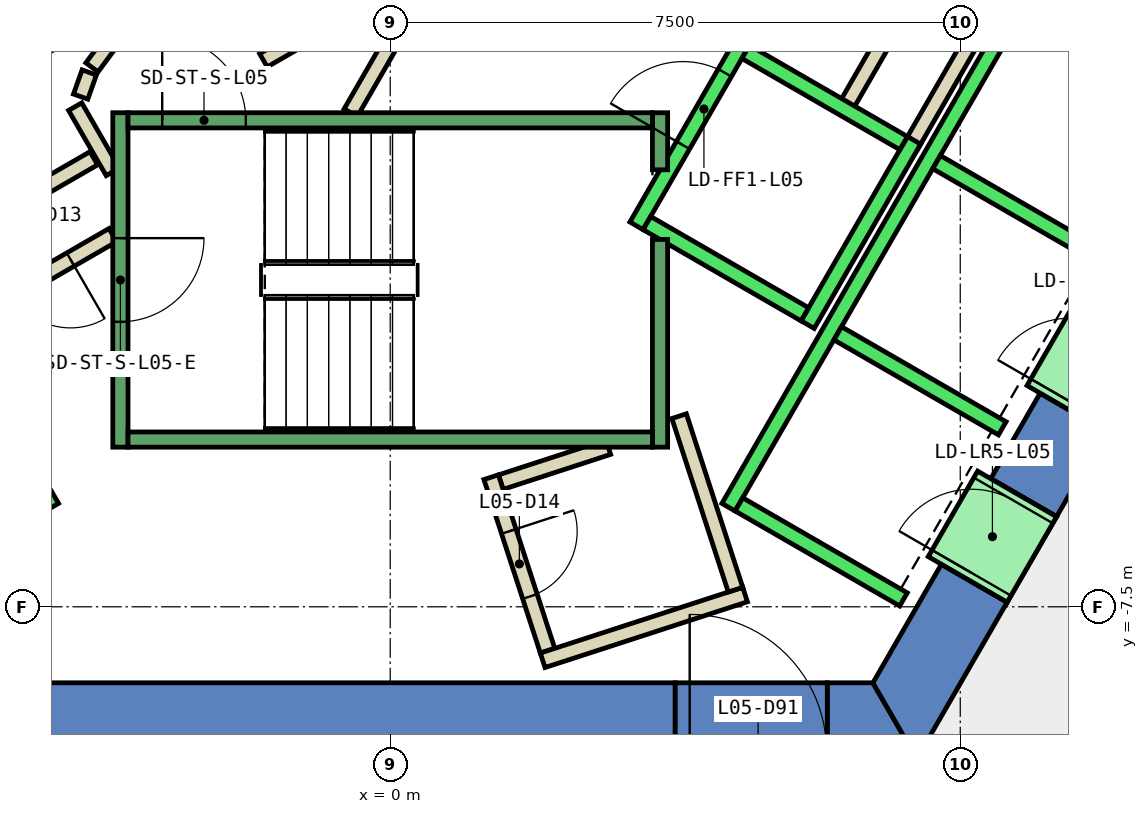
"""IFC4 building model, lengths in metres.
Left out: names, types, materials, properties, quantities, classifications, styles, units other than length and angle.
Written with IfcOpenShell. Run it as: python <this file> out.ifc"""

import sys

from ifc_helpers import new_model, si_unit, direction, frame, frame_2d, origin, place, context, subcontext, project, spatial, polyline, rectangle, outline, extrude, element, fill, save


model = new_model("IFC4")
c1 = context("Model", 3, precision=1e-05, world=origin(), true_north=direction((0.0, 1.0)))
c2 = subcontext(c1, "Body", "Model", "MODEL_VIEW")
j1 = project(units=[si_unit("LENGTHUNIT", "METRE"), si_unit("PLANEANGLEUNIT", "RADIAN")], contexts=[c1])
p1 = place(None, origin())
s1 = spatial("IfcSite", under=j1, at=p1, CompositionType="ELEMENT")
p2 = place(p1, origin())
s2 = spatial("IfcBuilding", under=s1, at=p2, CompositionType="ELEMENT")
p3 = place(p2, frame((0.0, 0.0, 30.0)))
s3 = spatial("IfcBuildingStorey", under=s2, at=p3, CompositionType="ELEMENT", Elevation=30.0)
p4 = place(p3, frame((0.0, 0.0, -0.45)))
e1 = element("IfcWall", 1, at=p4, inside=s3, PredefinedType="SHEAR", context=c2, shape_type="SweptSolid", body=[
    extrude(outline(polyline([(3.75, -9.5), (3.75, -8.5), (-6.351, -8.5), (-6.928, -9.5), (3.75, -9.5)])), origin(), (0.0, 0.0, 1.0), 4.85),
])
p5 = place(p3, frame((0.0, 0.0, -0.45)))
e2 = element("IfcWall", 2, at=p5, inside=s3, PredefinedType="SHEAR", context=c2, shape_type="SweptSolid", body=[
    extrude(outline(polyline([(5.75, -8.5), (5.75, -9.5), (6.928, -9.5), (6.351, -8.5), (5.75, -8.5)])), origin(), (0.0, 0.0, 1.0), 4.85),
])
p6 = place(p3, frame((0.0, 0.0, 3.6)))
e3 = element("IfcWall", 3, at=p6, inside=s3, PredefinedType="SHEAR", context=c2, shape_type="SweptSolid", body=[
    extrude(outline(polyline([(5.75, -9.5), (5.75, -8.5), (3.75, -8.5), (3.75, -9.5), (5.75, -9.5)])), origin(), (0.0, 0.0, 1.0), 0.8),
])
p7 = place(p3, frame((0.0, 0.0, -0.45)))
e4 = element("IfcWall", 4, at=p7, inside=s3, PredefinedType="SHEAR", context=c2, shape_type="SweptSolid", body=[
    extrude(outline(polyline([(8.117, -7.44), (7.252, -6.94), (6.351, -8.5), (6.928, -9.5), (8.117, -7.44)])), origin(), (0.0, 0.0, 1.0), 4.85),
])
p8 = place(p3, frame((0.0, 0.0, -0.45)))
e5 = element("IfcWall", 5, at=p8, inside=s3, PredefinedType="SHEAR", context=c2, shape_type="SweptSolid", body=[
    extrude(outline(polyline([(9.417, -5.189), (8.551, -4.689), (7.902, -5.814), (8.767, -6.314), (9.417, -5.189)])), origin(), (0.0, 0.0, 1.0), 4.85),
])
p9 = place(p3, frame((0.0, 0.0, 3.6)))
e6 = element("IfcWall", 6, at=p9, inside=s3, PredefinedType="SHEAR", context=c2, shape_type="SweptSolid", body=[
    extrude(outline(polyline([(8.767, -6.314), (7.902, -5.814), (7.252, -6.94), (8.117, -7.44), (8.767, -6.314)])), origin(), (0.0, 0.0, 1.0), 0.8),
])
p10 = place(p3, frame((0.0, 0.0, 3.6)))
e7 = element("IfcWall", 7, at=p10, inside=s3, PredefinedType="SHEAR", context=c2, shape_type="SweptSolid", body=[
    extrude(outline(polyline([(10.067, -4.063), (9.201, -3.563), (8.551, -4.689), (9.417, -5.189), (10.067, -4.063)])), origin(), (0.0, 0.0, 1.0), 0.8),
])
p11 = place(p3, frame((6.826, 0.522, 0.0), z_axis=(0.0, 0.0, 1.0), x_axis=(-0.500016722714, -0.866015748706, 0.0)))
e8 = element("IfcWall", 8, at=p11, inside=s3, PredefinedType="PARTITIONING", context=c2, shape_type="SweptSolid", body=[
    extrude(rectangle(XDim=1.7, YDim=0.2, at=frame_2d((0.85, 0.0))), origin(), (0.0, 0.0, 1.0), 4.4),
])
p12 = place(p3, frame((8.192, 0.888, 0.0), z_axis=(0.0, 0.0, 1.0), x_axis=(-0.499940625693, -0.866059680843, 0.0)))
e9 = element("IfcWall", 9, at=p12, inside=s3, PredefinedType="PARTITIONING", context=c2, shape_type="SweptSolid", body=[
    extrude(rectangle(XDim=2.68, YDim=0.2, at=frame_2d((1.34, 0.0))), origin(), (0.0, 0.0, 1.0), 4.4),
])
p13 = place(p3, frame((-3.9, -1.599, 0.0), z_axis=(0.0, 0.0, 1.0), x_axis=(-0.865969445389, -0.500096910261, 0.0)))
e10 = element("IfcWall", 10, at=p13, inside=s3, PredefinedType="PARTITIONING", context=c2, shape_type="SweptSolid", body=[
    extrude(rectangle(XDim=1.373, YDim=0.2, at=frame_2d((0.687, 0.0))), origin(), (0.0, 0.0, 1.0), 4.4),
])
p14 = place(p3, frame((-4.145, -0.92, 0.0), z_axis=(0.0, 0.0, 1.0), x_axis=(0.499743786207, -0.866173278362, 0.0)))
e11 = element("IfcWall", 11, at=p14, inside=s3, PredefinedType="PARTITIONING", context=c2, shape_type="SweptSolid", body=[
    extrude(rectangle(XDim=0.991, YDim=0.2, at=frame_2d((0.495, 0.0))), origin(), (0.0, 0.0, 1.0), 4.4),
])
p15 = place(p3, frame((-3.65, -2.61, 0.0), z_axis=(0.0, 0.0, 1.0), x_axis=(-0.866072462134, -0.499918483688, 0.0)))
e12 = element("IfcWall", 12, at=p15, inside=s3, PredefinedType="PARTITIONING", context=c2, shape_type="SweptSolid", body=[
    extrude(rectangle(XDim=2.084, YDim=0.2, at=frame_2d((1.042, 0.0))), origin(), (0.0, 0.0, 1.0), 4.4),
])
p16 = place(p15, frame((0.642, 0.0, 0.0)))
e13 = element("IfcOpeningElement", 13, at=p16, cuts=e12, PredefinedType="OPENING", context=c2, shape_type="SweptSolid", body=[
    extrude(rectangle(XDim=0.9, YDim=2.1, at=frame_2d((0.45, 1.05))), frame((0.0, 0.11, 0.0), z_axis=(0.0, -1.0, 0.0), x_axis=(1.0, 0.0, 0.0)), (0.0, 0.0, 1.0), 0.22),
])
p17 = place(p3, frame((2.869, -5.4, 0.0), z_axis=(0.0, 0.0, 1.0), x_axis=(-0.950892787506, -0.309520446287, 0.0)))
e14 = element("IfcWall", 14, at=p17, inside=s3, PredefinedType="PARTITIONING", context=c2, shape_type="SweptSolid", body=[
    extrude(rectangle(XDim=1.487, YDim=0.2, at=frame_2d((0.743, 0.0))), origin(), (0.0, 0.0, 1.0), 4.4),
])
p18 = place(p3, frame((1.328, -5.795, 0.0), z_axis=(0.0, 0.0, 1.0), x_axis=(0.309171157328, -0.951006411901, 0.0)))
e15 = element("IfcWall", 15, at=p18, inside=s3, PredefinedType="PARTITIONING", context=c2, shape_type="SweptSolid", body=[
    extrude(rectangle(XDim=2.401, YDim=0.2, at=frame_2d((1.2, 0.0))), origin(), (0.0, 0.0, 1.0), 4.4),
])
p19 = place(p18, frame((0.75, 0.0, 0.0)))
e16 = element("IfcOpeningElement", 16, at=p19, cuts=e15, PredefinedType="OPENING", context=c2, shape_type="SweptSolid", body=[
    extrude(rectangle(XDim=0.9, YDim=2.1, at=frame_2d((0.45, 1.05))), frame((0.0, 0.11, 0.0), z_axis=(0.0, -1.0, 0.0), x_axis=(1.0, 0.0, 0.0)), (0.0, 0.0, 1.0), 0.22),
])
p20 = place(p3, frame((2.006, -8.204, 0.0), z_axis=(0.0, 0.0, 1.0), x_axis=(0.951079555704, 0.308946077369, 0.0)))
e17 = element("IfcWall", 17, at=p20, inside=s3, PredefinedType="PARTITIONING", context=c2, shape_type="SweptSolid", body=[
    extrude(rectangle(XDim=2.8, YDim=0.2, at=frame_2d((1.4, 0.0))), origin(), (0.0, 0.0, 1.0), 4.4),
])
p21 = place(p3, frame((4.543, -7.275, 0.0), z_axis=(0.0, 0.0, 1.0), x_axis=(-0.309079173229, 0.951036310914, 0.0)))
e18 = element("IfcWall", 18, at=p21, inside=s3, PredefinedType="PARTITIONING", context=c2, shape_type="SweptSolid", body=[
    extrude(rectangle(XDim=2.4, YDim=0.2, at=frame_2d((1.2, 0.0))), origin(), (0.0, 0.0, 1.0), 4.4),
])
p22 = place(p3, frame((-0.52, -1.0, 0.0), z_axis=(0.0, 0.0, 1.0), x_axis=(0.50011622646, 0.865958290007, 0.0)))
e19 = element("IfcWall", 19, at=p22, inside=s3, PredefinedType="PARTITIONING", context=c2, shape_type="SweptSolid", body=[
    extrude(rectangle(XDim=4.991, YDim=0.2, at=frame_2d((2.496, 0.0))), origin(), (0.0, 0.0, 1.0), 4.4),
])
p23 = place(p22, frame((1.945, 0.0, 0.0)))
e20 = element("IfcOpeningElement", 20, at=p23, cuts=e19, PredefinedType="OPENING", context=c2, shape_type="SweptSolid", body=[
    extrude(rectangle(XDim=1.0, YDim=2.1, at=frame_2d((0.5, 1.05))), frame((0.0, 0.11, 0.0), z_axis=(0.0, -1.0, 0.0), x_axis=(1.0, 0.0, 0.0)), (0.0, 0.0, 1.0), 0.22),
])
p24 = place(p3, frame((-0.412, 0.414, 0.0), z_axis=(0.0, 0.0, 1.0), x_axis=(-0.866017369001, -0.500013916395, 0.0)))
e21 = element("IfcWall", 21, at=p24, inside=s3, PredefinedType="PARTITIONING", context=c2, shape_type="SweptSolid", body=[
    extrude(rectangle(XDim=1.45, YDim=0.2, at=frame_2d((0.725, 0.0))), origin(), (0.0, 0.0, 1.0), 4.4),
])
p25 = place(p3, frame((-3.723, -0.131, 0.0), z_axis=(0.0, 0.0, 1.0), x_axis=(-0.594675113454, -0.803966112121, 0.0)))
e22 = element("IfcWall", 22, at=p25, inside=s3, PredefinedType="PARTITIONING", context=c2, shape_type="SweptSolid", body=[
    extrude(rectangle(XDim=0.338, YDim=0.2, at=frame_2d((0.169, 0.0))), origin(), (0.0, 0.0, 1.0), 4.4),
])
p26 = place(p3, frame((-3.96, -0.47, 0.0), z_axis=(0.0, 0.0, 1.0), x_axis=(-0.334824194261, -0.942280615813, 0.0)))
e23 = element("IfcWall", 23, at=p26, inside=s3, PredefinedType="PARTITIONING", context=c2, shape_type="SweptSolid", body=[
    extrude(rectangle(XDim=0.338, YDim=0.2, at=frame_2d((0.169, 0.0))), origin(), (0.0, 0.0, 1.0), 4.4),
])
p27 = place(p3, frame((-9.751, 2.99, 0.0), z_axis=(0.0, 0.0, 1.0), x_axis=(0.50000090737, -0.866024879913, 0.0)))
e24 = element("IfcWall", 24, at=p27, inside=s3, PredefinedType="STANDARD", context=c2, shape_type="SweptSolid", body=[
    extrude(rectangle(XDim=10.6, YDim=0.2, at=frame_2d((5.3, 0.0))), origin(), (0.0, 0.0, 1.0), 4.4),
])
p28 = place(p3, frame((3.24, -2.488, 0.0), z_axis=(0.0, 0.0, 1.0), x_axis=(0.49994636267, 0.866056369097, 0.0)))
e25 = element("IfcWall", 25, at=p28, inside=s3, PredefinedType="STANDARD", context=c2, shape_type="SweptSolid", body=[
    extrude(rectangle(XDim=2.8, YDim=0.2, at=frame_2d((1.4, 0.0))), origin(), (0.0, 0.0, 1.0), 4.4),
])
p29 = place(p28, frame((1.225, 0.0, 0.0)))
e26 = element("IfcOpeningElement", 26, at=p29, cuts=e25, PredefinedType="OPENING", context=c2, shape_type="SweptSolid", body=[
    extrude(rectangle(XDim=1.1, YDim=2.1, at=frame_2d((0.55, 1.05))), frame((0.0, 0.11, 0.0), z_axis=(0.0, -1.0, 0.0), x_axis=(1.0, 0.0, 0.0)), (0.0, 0.0, 1.0), 0.22),
])
p30 = place(p3, frame((5.492, -3.788, 0.0), z_axis=(0.0, 0.0, 1.0), x_axis=(0.500011755427, 0.866018616679, 0.0)))
e27 = element("IfcWall", 27, at=p30, inside=s3, PredefinedType="STANDARD", context=c2, shape_type="SweptSolid", body=[
    extrude(rectangle(XDim=2.8, YDim=0.2, at=frame_2d((1.4, 0.0))), origin(), (0.0, 0.0, 1.0), 4.4),
])
p31 = place(p3, frame((3.377, -2.452, 0.0), z_axis=(0.0, 0.0, 1.0), x_axis=(0.865955154139, -0.50012165622, 0.0)))
e28 = element("IfcWall", 28, at=p31, inside=s3, PredefinedType="STANDARD", context=c2, shape_type="SweptSolid", body=[
    extrude(rectangle(XDim=2.4, YDim=0.2, at=frame_2d((1.2, 0.0))), origin(), (0.0, 0.0, 1.0), 4.4),
])
p32 = place(p3, frame((4.677, -0.2, 0.0), z_axis=(0.0, 0.0, 1.0), x_axis=(0.865973769406, -0.500089422704, 0.0)))
e29 = element("IfcWall", 29, at=p32, inside=s3, PredefinedType="STANDARD", context=c2, shape_type="SweptSolid", body=[
    extrude(rectangle(XDim=2.399, YDim=0.2, at=frame_2d((1.2, 0.0))), origin(), (0.0, 0.0, 1.0), 4.4),
])
p33 = place(p3, frame((4.451, -6.19, 0.0), z_axis=(0.0, 0.0, 1.0), x_axis=(0.50000090737, 0.866024879913, 0.0)))
e30 = element("IfcWall", 30, at=p33, inside=s3, PredefinedType="STANDARD", context=c2, shape_type="SweptSolid", body=[
    extrude(rectangle(XDim=10.6, YDim=0.2, at=frame_2d((5.3, 0.0))), origin(), (0.0, 0.0, 1.0), 4.4),
])
for number, where, z_axis, x_axis in (
    (31, (4.588, -6.153, 0.0), (0.0, 0.0, 1.0), (0.866, -0.5, 0.0)),
    (32, (5.888, -3.902, 0.0), (0.0, 0.0, 1.0), (0.866, -0.5, 0.0)),
    (33, (7.188, -1.65, 0.0), (0.0, 0.0, 1.0), (0.866, -0.5, 0.0)),
    (34, (8.488, 0.602, 0.0), (0.0, 0.0, 1.0), (0.866, -0.5, 0.0)),
):
    element("IfcWall", number, at=place(p3, frame(where, z_axis=z_axis, x_axis=x_axis)), inside=s3, PredefinedType="STANDARD", context=c2, shape_type="SweptSolid", body=[
        extrude(rectangle(XDim=2.5, YDim=0.2, at=frame_2d((1.25, 0.0))), origin(), (0.0, 0.0, 1.0), 4.4),
    ])
p34 = place(p3, frame((7.598, -7.14, 0.0), z_axis=(0.0, 0.0, 1.0), x_axis=(0.500362116554, 0.865816234728, 0.0)))
e35 = element("IfcWall", 35, at=p34, inside=s3, PredefinedType="STANDARD", context=c2, shape_type="SweptSolid", body=[
    extrude(rectangle(XDim=1.299, YDim=1.2, at=frame_2d((0.65, 0.0))), origin(), (0.0, 0.0, 1.0), 2.4),
])
p35 = place(p34, frame((0.1, 0.0, 0.0)))
e36 = element("IfcOpeningElement", 36, at=p35, cuts=e35, PredefinedType="OPENING", context=c2, shape_type="SweptSolid", body=[
    extrude(rectangle(XDim=1.1, YDim=2.3, at=frame_2d((0.55, 1.15))), frame((0.0, 0.61, 0.0), z_axis=(0.0, -1.0, 0.0), x_axis=(1.0, 0.0, 0.0)), (0.0, 0.0, 1.0), 1.22),
])
p36 = place(p3, frame((8.898, -4.889, 0.0), z_axis=(0.0, 0.0, 1.0), x_axis=(0.500036693733, 0.866004217611, 0.0)))
e37 = element("IfcWall", 37, at=p36, inside=s3, PredefinedType="STANDARD", context=c2, shape_type="SweptSolid", body=[
    extrude(rectangle(XDim=1.3, YDim=1.2, at=frame_2d((0.65, 0.0))), origin(), (0.0, 0.0, 1.0), 2.4),
])
p37 = place(p36, frame((0.1, 0.0, 0.0)))
e38 = element("IfcOpeningElement", 38, at=p37, cuts=e37, PredefinedType="OPENING", context=c2, shape_type="SweptSolid", body=[
    extrude(rectangle(XDim=1.1, YDim=2.3, at=frame_2d((0.55, 1.15))), frame((0.0, 0.61, 0.0), z_axis=(0.0, -1.0, 0.0), x_axis=(1.0, 0.0, 0.0)), (0.0, 0.0, 1.0), 1.22),
])
p38 = place(p3, frame((-3.55, -1.0, 0.0), z_axis=(0.0, 0.0, 1.0), x_axis=(0.0, -1.0, 0.0)))
e39 = element("IfcWall", 39, at=p38, inside=s3, PredefinedType="STANDARD", context=c2, shape_type="SweptSolid", body=[
    extrude(rectangle(XDim=4.4, YDim=0.2, at=frame_2d((2.2, 0.0))), origin(), (0.0, 0.0, 1.0), 4.4),
])
p39 = place(p38, frame((1.65, 0.0, 0.0)))
e40 = element("IfcOpeningElement", 40, at=p39, cuts=e39, PredefinedType="OPENING", context=c2, shape_type="SweptSolid", body=[
    extrude(rectangle(XDim=1.1, YDim=2.2, at=frame_2d((0.55, 1.1))), frame((0.0, 0.11, 0.0), z_axis=(0.0, -1.0, 0.0), x_axis=(1.0, 0.0, 0.0)), (0.0, 0.0, 1.0), 0.22),
])
p40 = place(p3, frame((3.55, -2.667, 0.0), z_axis=(0.0, 0.0, 1.0), x_axis=(0.0, -1.0, 0.0)))
e41 = element("IfcWall", 41, at=p40, inside=s3, PredefinedType="STANDARD", context=c2, shape_type="SweptSolid", body=[
    extrude(rectangle(XDim=2.733, YDim=0.2, at=frame_2d((1.366, 0.0))), origin(), (0.0, 0.0, 1.0), 4.4),
])
p41 = place(p3, frame((3.55, -1.0, 0.0), z_axis=(0.0, 0.0, 1.0), x_axis=(0.0, -1.0, 0.0)))
e42 = element("IfcWall", 42, at=p41, inside=s3, PredefinedType="STANDARD", context=c2, shape_type="SweptSolid", body=[
    extrude(rectangle(XDim=0.751, YDim=0.2, at=frame_2d((0.375, 0.0))), origin(), (0.0, 0.0, 1.0), 4.4),
])
p42 = place(p3, frame((-3.45, -1.1, 0.0), z_axis=(0.0, 0.0, 1.0), x_axis=(1.0, 0.0, 0.0)))
e43 = element("IfcWall", 43, at=p42, inside=s3, PredefinedType="STANDARD", context=c2, shape_type="SweptSolid", body=[
    extrude(rectangle(XDim=6.9, YDim=0.2, at=frame_2d((3.45, 0.0))), origin(), (0.0, 0.0, 1.0), 4.4),
])
p43 = place(p42, frame((0.45, 0.0, 0.0)))
e44 = element("IfcOpeningElement", 44, at=p43, cuts=e43, PredefinedType="OPENING", context=c2, shape_type="SweptSolid", body=[
    extrude(rectangle(XDim=1.1, YDim=2.2, at=frame_2d((0.55, 1.1))), frame((0.0, 0.11, 0.0), z_axis=(0.0, -1.0, 0.0), x_axis=(1.0, 0.0, 0.0)), (0.0, 0.0, 1.0), 0.22),
])
p44 = place(p3, frame((-3.45, -5.3, 0.0), z_axis=(0.0, 0.0, 1.0), x_axis=(1.0, 0.0, 0.0)))
e45 = element("IfcWall", 45, at=p44, inside=s3, PredefinedType="STANDARD", context=c2, shape_type="SweptSolid", body=[
    extrude(rectangle(XDim=6.9, YDim=0.2, at=frame_2d((3.45, 0.0))), origin(), (0.0, 0.0, 1.0), 4.4),
])
p45 = place(p16, origin())
e46 = element("IfcDoor", 46, at=p45, inside=s3, OperationType="SINGLE_SWING_LEFT", PredefinedType="DOOR", context=c2, shape_type="SweptSolid", body=[
    extrude(rectangle(XDim=0.9, YDim=2.1, at=frame_2d((0.45, 1.05))), frame((0.0, 0.025, 0.0), z_axis=(0.0, -1.0, 0.0), x_axis=(1.0, 0.0, 0.0)), (0.0, 0.0, 1.0), 0.05),
])
fill(e13, e46)
p46 = place(p19, origin())
e47 = element("IfcDoor", 47, at=p46, inside=s3, OperationType="SINGLE_SWING_LEFT", PredefinedType="DOOR", context=c2, shape_type="SweptSolid", body=[
    extrude(rectangle(XDim=0.9, YDim=2.1, at=frame_2d((0.45, 1.05))), frame((0.0, 0.025, 0.0), z_axis=(0.0, -1.0, 0.0), x_axis=(1.0, 0.0, 0.0)), (0.0, 0.0, 1.0), 0.05),
])
fill(e16, e47)
p47 = place(p35, origin())
e48 = element("IfcDoor", 48, at=p47, inside=s3, OperationType="SLIDING_TO_LEFT", PredefinedType="DOOR", context=c2, shape_type="SweptSolid", body=[
    extrude(rectangle(XDim=1.1, YDim=2.3, at=frame_2d((0.55, 1.15))), frame((0.0, 0.025, 0.0), z_axis=(0.0, -1.0, 0.0), x_axis=(1.0, 0.0, 0.0)), (0.0, 0.0, 1.0), 0.05),
])
fill(e36, e48)
p48 = place(p29, origin())
e49 = element("IfcDoor", 49, at=p48, inside=s3, OperationType="SLIDING_TO_LEFT", PredefinedType="DOOR", context=c2, shape_type="SweptSolid", body=[
    extrude(rectangle(XDim=1.1, YDim=2.1, at=frame_2d((0.55, 1.05))), frame((0.0, 0.025, 0.0), z_axis=(0.0, -1.0, 0.0), x_axis=(1.0, 0.0, 0.0)), (0.0, 0.0, 1.0), 0.05),
])
fill(e26, e49)
p49 = place(p43, origin())
e50 = element("IfcDoor", 50, at=p49, inside=s3, OperationType="SINGLE_SWING_LEFT", PredefinedType="DOOR", context=c2, shape_type="SweptSolid", body=[
    extrude(rectangle(XDim=1.1, YDim=2.2, at=frame_2d((0.55, 1.1))), frame((0.0, 0.025, 0.0), z_axis=(0.0, -1.0, 0.0), x_axis=(1.0, 0.0, 0.0)), (0.0, 0.0, 1.0), 0.05),
])
fill(e44, e50)
p50 = place(p39, origin())
e51 = element("IfcDoor", 51, at=p50, inside=s3, OperationType="SINGLE_SWING_LEFT", PredefinedType="DOOR", context=c2, shape_type="SweptSolid", body=[
    extrude(rectangle(XDim=1.1, YDim=2.2, at=frame_2d((0.55, 1.1))), frame((0.0, 0.025, 0.0), z_axis=(0.0, -1.0, 0.0), x_axis=(1.0, 0.0, 0.0)), (0.0, 0.0, 1.0), 0.05),
])
fill(e40, e51)
save(model, sys.argv[1])
